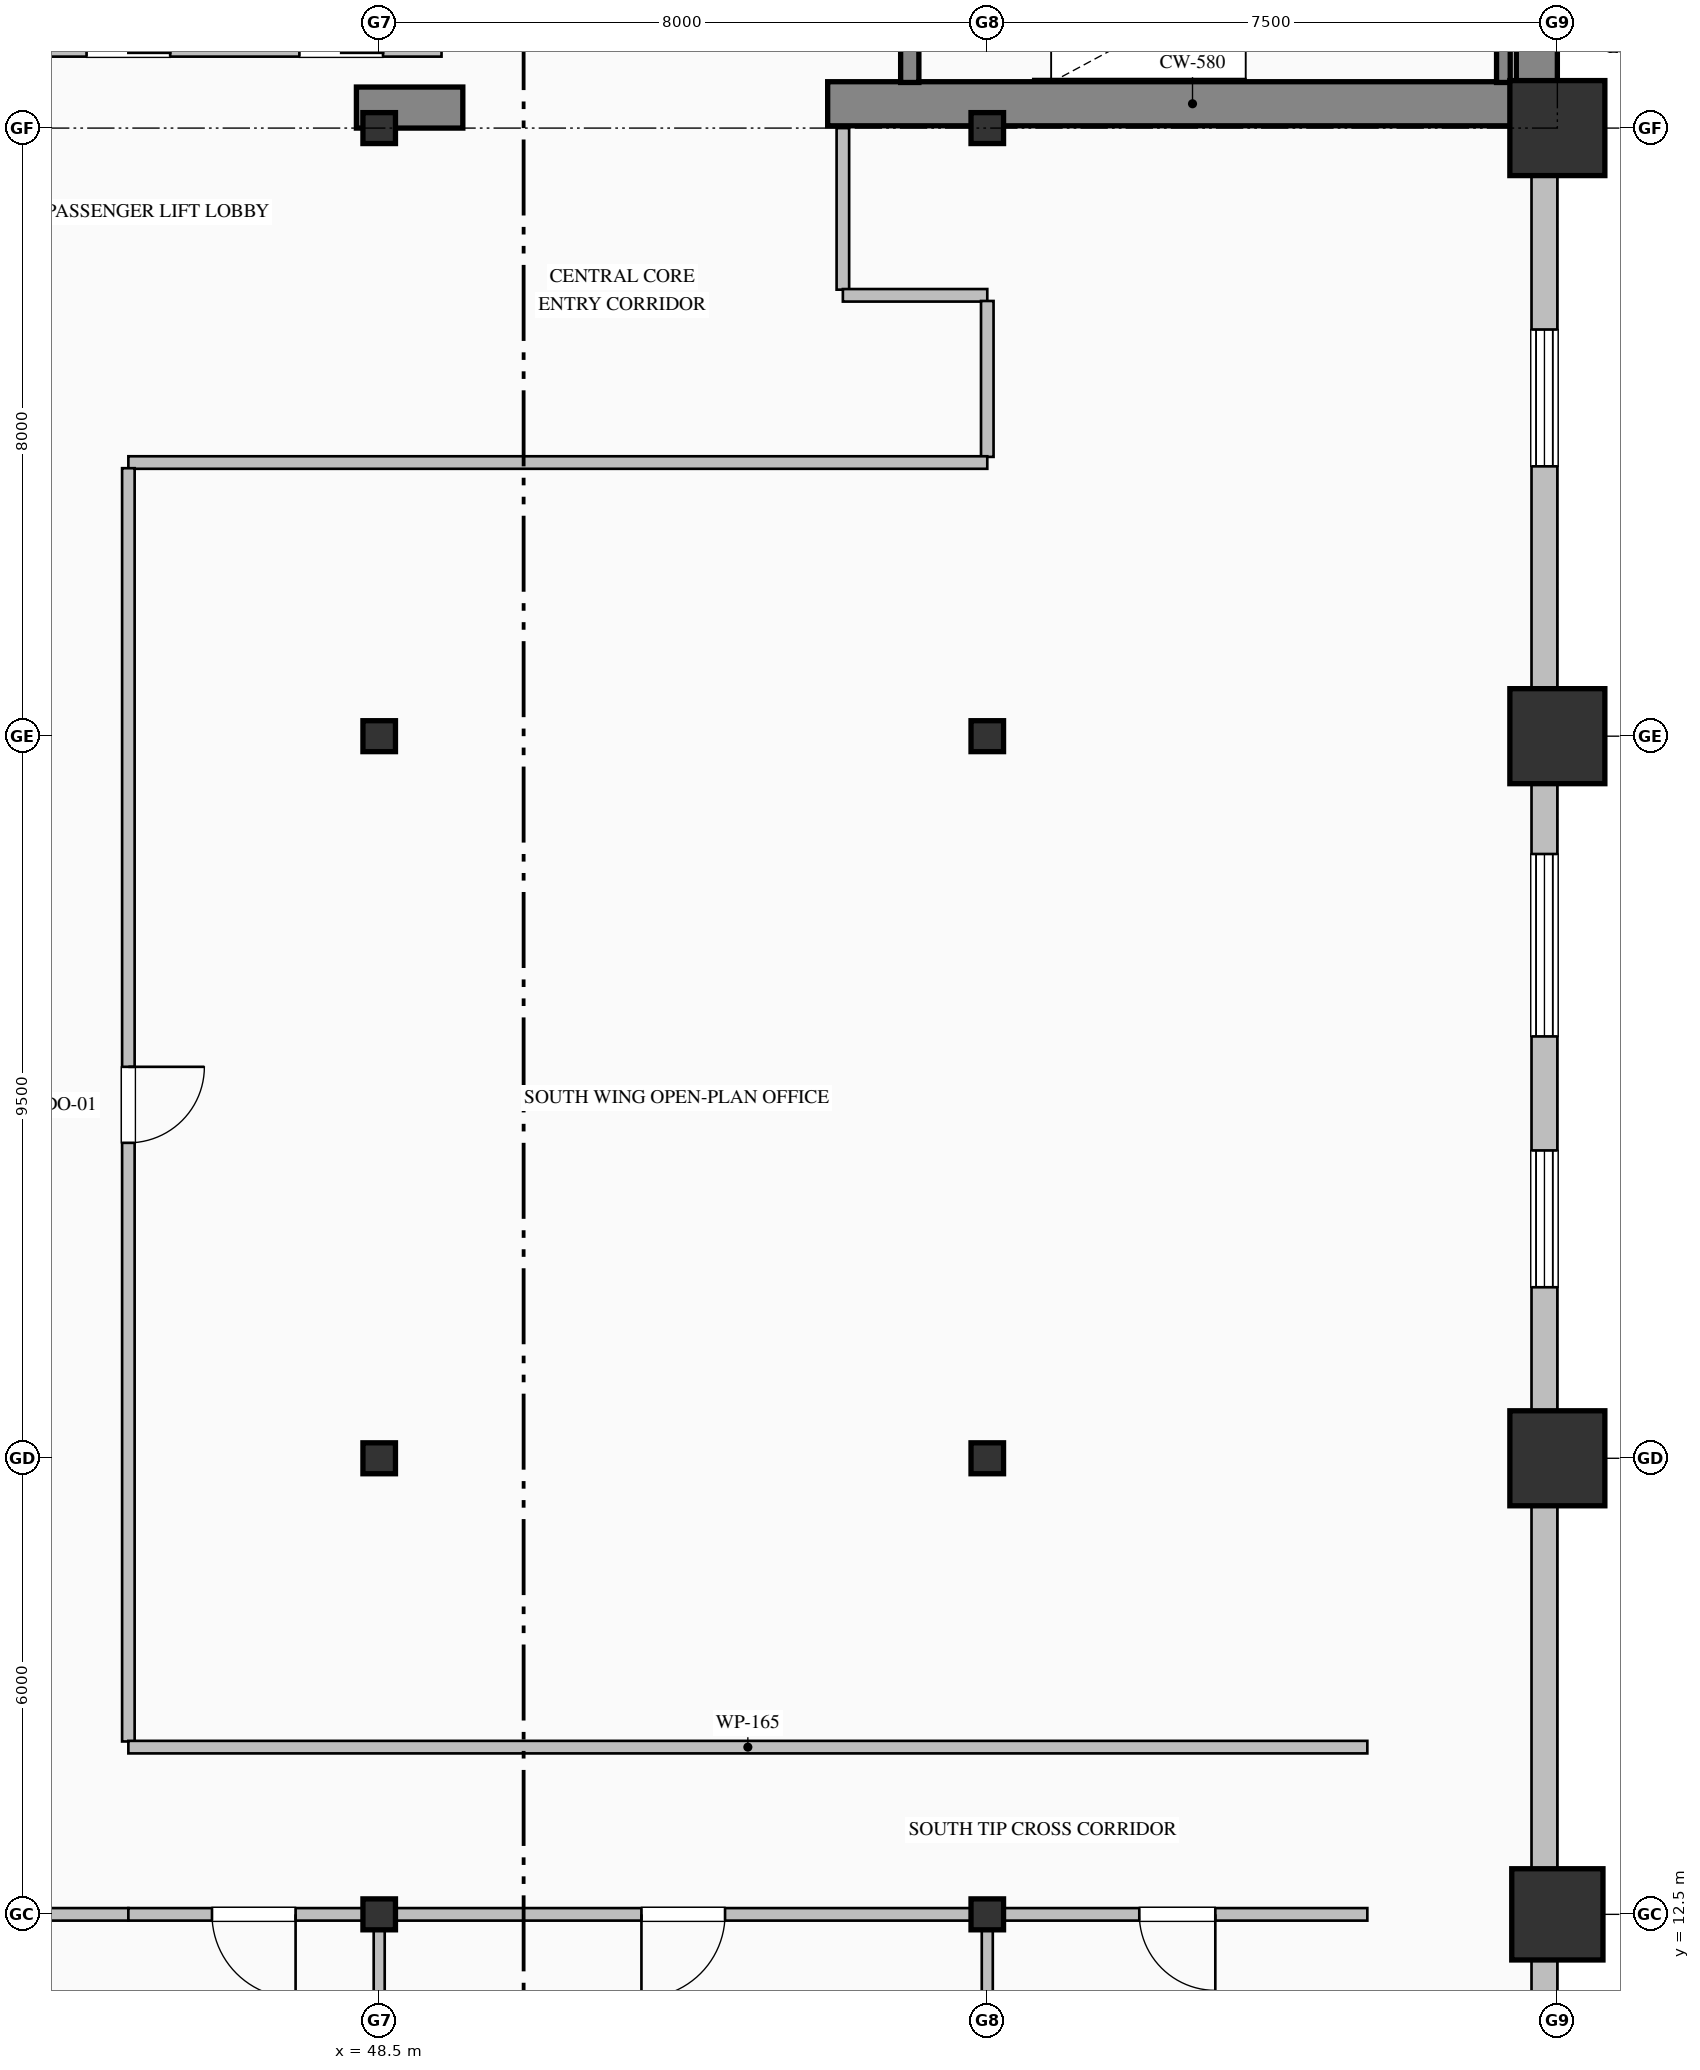
"""IFC4 building model, lengths in metres.
Left out: names, types, materials, properties, quantities, classifications, styles, units other than length and angle.
Written with IfcOpenShell. Run it as: python <this file> out.ifc"""

import sys

from ifc_helpers import new_model, si_unit, direction, frame, frame_2d, origin, origin_2d, place, context, subcontext, project, spatial, rectangle, hollow_rectangle, hollow_circle, i_section, extrude, element, fill, save


model = new_model("IFC4")
c1 = context("Model", 3, precision=1e-05, world=origin(), true_north=direction((0.0, 1.0)))
c2 = subcontext(c1, "Body", "Model", "MODEL_VIEW")
j1 = project(units=[si_unit("LENGTHUNIT", "METRE"), si_unit("PLANEANGLEUNIT", "RADIAN")], contexts=[c1])
p1 = place(None, origin())
s1 = spatial("IfcSite", under=j1, at=p1, CompositionType="ELEMENT")
p2 = place(p1, origin())
s2 = spatial("IfcBuilding", under=s1, at=p2, CompositionType="ELEMENT")
p3 = place(p2, frame((0.0, 0.0, 52.2)))
s3 = spatial("IfcBuildingStorey", under=s2, at=p3, CompositionType="ELEMENT", Elevation=52.2)
p4 = place(p3, frame((63.73, 36.32, 0.0), z_axis=(0.0, 0.0, 1.0), x_axis=(0.0, 1.0, 0.0)))
e1 = element("IfcWall", 1, at=p4, inside=s3, PredefinedType="SHEAR", context=c2, shape_type="SweptSolid", body=[
    extrude(rectangle(XDim=15.14, YDim=0.54, at=frame_2d((7.57, 0.0))), origin(), (0.0, 0.0, 1.0), 3.75),
])
p5 = place(p3, frame((48.2, 36.27, 0.0), z_axis=(0.0, 0.0, 1.0), x_axis=(1.0, 0.0, 0.0)))
e2 = element("IfcWall", 2, at=p5, inside=s3, PredefinedType="SHEAR", context=c2, shape_type="SweptSolid", body=[
    extrude(rectangle(XDim=1.4, YDim=0.54, at=frame_2d((0.7, 0.0))), origin(), (0.0, 0.0, 1.0), 3.75),
])
p6 = place(p3, frame((54.4, 36.32, 0.0), z_axis=(0.0, 0.0, 1.0), x_axis=(1.0, 0.0, 0.0)))
e3 = element("IfcWall", 3, at=p6, inside=s3, PredefinedType="SHEAR", context=c2, shape_type="SweptSolid", body=[
    extrude(rectangle(XDim=9.6, YDim=0.58, at=frame_2d((4.8, 0.0))), origin(), (0.0, 0.0, 1.0), 4.0),
])
for number, where, z_axis, x_axis in (
    (4, (48.5, 12.5, 0.0), (0.0, 0.0, 1.0), (1.0, 0.0, 0.0)),
    (5, (48.5, 18.5, 0.0), (0.0, 0.0, 1.0), (1.0, 0.0, 0.0)),
    (6, (48.5, 28.0, 0.0), (0.0, 0.0, 1.0), (1.0, 0.0, 0.0)),
    (7, (48.5, 36.0, 0.0), (0.0, 0.0, 1.0), (1.0, 0.0, 0.0)),
    (8, (56.5, 12.5, 0.0), (0.0, 0.0, 1.0), (1.0, 0.0, 0.0)),
    (9, (56.5, 18.5, 0.0), (0.0, 0.0, 1.0), (1.0, 0.0, 0.0)),
    (10, (56.5, 28.0, 0.0), (0.0, 0.0, 1.0), (1.0, 0.0, 0.0)),
    (11, (56.5, 36.0, 0.0), (0.0, 0.0, 1.0), (1.0, 0.0, 0.0)),
):
    element("IfcColumn", number, at=place(p3, frame(where, z_axis=z_axis, x_axis=x_axis)), inside=s3, PredefinedType="COLUMN", context=c2, shape_type="SweptSolid", body=[
        extrude(i_section(OverallWidth=0.407, OverallDepth=0.428, WebThickness=0.02, FlangeThickness=0.035, FilletRadius=0.022, at=origin_2d()), origin(), (0.0, 0.0, 1.0), 4.0),
    ])
p7 = place(p3, frame((64.0, 12.5, 0.0), z_axis=(0.0, 0.0, 1.0), x_axis=(1.0, 0.0, 0.0)))
e12 = element("IfcColumn", 12, at=p7, inside=s3, PredefinedType="COLUMN", context=c2, shape_type="SweptSolid", body=[
    extrude(hollow_circle(Radius=0.6, WallThickness=0.04, at=origin_2d()), origin(), (0.0, 0.0, 1.0), 4.0),
])
for number, where, z_axis, x_axis in (
    (13, (64.0, 18.5, 0.0), (0.0, 0.0, 1.0), (1.0, 0.0, 0.0)),
    (14, (64.0, 28.0, 0.0), (0.0, 0.0, 1.0), (1.0, 0.0, 0.0)),
    (15, (64.0, 36.0, 0.0), (0.0, 0.0, 1.0), (1.0, 0.0, 0.0)),
):
    element("IfcColumn", number, at=place(p3, frame(where, z_axis=z_axis, x_axis=x_axis)), inside=s3, PredefinedType="COLUMN", context=c2, shape_type="SweptSolid", body=[
        extrude(hollow_rectangle(XDim=1.25, YDim=1.25, WallThickness=0.045, at=origin_2d()), origin(), (0.0, 0.0, 1.0), 4.0),
    ])
p8 = place(p3, frame((63.83, 36.05, 0.0), z_axis=(0.0, 0.0, 1.0), x_axis=(0.0, -1.0, 0.0)))
e16 = element("IfcWall", 16, at=p8, inside=s3, PredefinedType="SOLIDWALL", context=c2, shape_type="SweptSolid", body=[
    extrude(rectangle(XDim=28.05, YDim=0.34, at=frame_2d((14.025, 0.0))), origin(), (0.0, 0.0, 1.0), 3.25),
])
p9 = place(p8, frame((2.7, 0.0, 0.85)))
e17 = element("IfcOpeningElement", 17, at=p9, cuts=e16, PredefinedType="OPENING", context=c2, shape_type="SweptSolid", body=[
    extrude(rectangle(XDim=1.8, YDim=2.05, at=frame_2d((0.9, 1.025))), frame((0.0, 0.18, 0.0), z_axis=(0.0, -1.0, 0.0), x_axis=(1.0, 0.0, 0.0)), (0.0, 0.0, 1.0), 0.36),
])
p10 = place(p8, frame((9.6, 0.0, 0.8)))
e18 = element("IfcOpeningElement", 18, at=p10, cuts=e16, PredefinedType="OPENING", context=c2, shape_type="SweptSolid", body=[
    extrude(rectangle(XDim=2.4, YDim=2.15, at=frame_2d((1.2, 1.075))), frame((0.0, 0.18, 0.0), z_axis=(0.0, -1.0, 0.0), x_axis=(1.0, 0.0, 0.0)), (0.0, 0.0, 1.0), 0.36),
])
p11 = place(p8, frame((13.5, 0.0, 0.85)))
e19 = element("IfcOpeningElement", 19, at=p11, cuts=e16, PredefinedType="OPENING", context=c2, shape_type="SweptSolid", body=[
    extrude(rectangle(XDim=1.8, YDim=2.05, at=frame_2d((0.9, 1.025))), frame((0.0, 0.18, 0.0), z_axis=(0.0, -1.0, 0.0), x_axis=(1.0, 0.0, 0.0)), (0.0, 0.0, 1.0), 0.36),
])
p12 = place(p3, frame((55.48, 39.75, 0.0), z_axis=(0.0, 0.0, 1.0), x_axis=(0.0, -1.0, 0.0)))
e20 = element("IfcWall", 20, at=p12, inside=s3, PredefinedType="SOLIDWALL", context=c2, shape_type="SweptSolid", body=[
    extrude(rectangle(XDim=3.15, YDim=0.24, at=frame_2d((1.575, 0.0))), origin(), (0.0, 0.0, 1.0), 4.0),
])
p13 = place(p12, frame((1.0, 0.0, 0.0)))
e21 = element("IfcOpeningElement", 21, at=p13, cuts=e20, PredefinedType="OPENING", context=c2, shape_type="SweptSolid", body=[
    extrude(rectangle(XDim=1.15, YDim=2.2, at=frame_2d((0.575, 1.1))), frame((0.0, 0.13, 0.0), z_axis=(0.0, -1.0, 0.0), x_axis=(1.0, 0.0, 0.0)), (0.0, 0.0, 1.0), 0.26),
])
p14 = place(p3, frame((63.29, 36.6, 0.0), z_axis=(0.0, 0.0, 1.0), x_axis=(0.0, 1.0, 0.0)))
e22 = element("IfcWall", 22, at=p14, inside=s3, PredefinedType="SOLIDWALL", context=c2, shape_type="SweptSolid", body=[
    extrude(rectangle(XDim=3.15, YDim=0.18, at=frame_2d((1.575, 0.0))), origin(), (0.0, 0.0, 1.0), 4.0),
])
p15 = place(p3, frame((49.32, 37.05, 0.0), z_axis=(0.0, 0.0, 1.0), x_axis=(-1.0, 0.0, 0.0)))
e23 = element("IfcWall", 23, at=p15, inside=s3, PredefinedType="PARTITIONING", context=c2, shape_type="SweptSolid", body=[
    extrude(rectangle(XDim=8.24, YDim=0.22, at=frame_2d((4.12, 0.0))), origin(), (0.0, 0.0, 1.0), 3.75),
])
p16 = place(p15, frame((6.37, 0.0, 0.0)))
e24 = element("IfcOpeningElement", 24, at=p16, cuts=e23, PredefinedType="OPENING", context=c2, shape_type="SweptSolid", body=[
    extrude(rectangle(XDim=1.1, YDim=2.2, at=frame_2d((0.55, 1.1))), frame((0.0, 0.12, 0.0), z_axis=(0.0, -1.0, 0.0), x_axis=(1.0, 0.0, 0.0)), (0.0, 0.0, 1.0), 0.24),
])
p17 = place(p15, frame((3.57, 0.0, 0.0)))
e25 = element("IfcOpeningElement", 25, at=p17, cuts=e23, PredefinedType="OPENING", context=c2, shape_type="SweptSolid", body=[
    extrude(rectangle(XDim=1.1, YDim=2.2, at=frame_2d((0.55, 1.1))), frame((0.0, 0.12, 0.0), z_axis=(0.0, -1.0, 0.0), x_axis=(1.0, 0.0, 0.0)), (0.0, 0.0, 1.0), 0.24),
])
p18 = place(p15, frame((0.77, 0.0, 0.0)))
e26 = element("IfcOpeningElement", 26, at=p18, cuts=e23, PredefinedType="OPENING", context=c2, shape_type="SweptSolid", body=[
    extrude(rectangle(XDim=1.1, YDim=2.2, at=frame_2d((0.55, 1.1))), frame((0.0, 0.12, 0.0), z_axis=(0.0, -1.0, 0.0), x_axis=(1.0, 0.0, 0.0)), (0.0, 0.0, 1.0), 0.24),
])
p19 = place(p3, frame((54.6, 36.0, 0.0), z_axis=(0.0, 0.0, 1.0), x_axis=(0.0, -1.0, 0.0)))
e27 = element("IfcWall", 27, at=p19, inside=s3, PredefinedType="PARTITIONING", context=c2, shape_type="SweptSolid", body=[
    extrude(rectangle(XDim=2.125, YDim=0.165, at=frame_2d((1.063, 0.0))), origin(), (0.0, 0.0, 1.0), 3.75),
])
p20 = place(p3, frame((54.6, 33.8, 0.0), z_axis=(0.0, 0.0, 1.0), x_axis=(1.0, 0.0, 0.0)))
e28 = element("IfcWall", 28, at=p20, inside=s3, PredefinedType="PARTITIONING", context=c2, shape_type="SweptSolid", body=[
    extrude(rectangle(XDim=1.9, YDim=0.165, at=frame_2d((0.95, 0.0))), origin(), (0.0, 0.0, 1.0), 3.75),
])
p21 = place(p3, frame((56.5, 33.726, 0.0), z_axis=(0.0, 0.0, 1.0), x_axis=(0.0, -1.0, 0.0)))
e29 = element("IfcWall", 29, at=p21, inside=s3, PredefinedType="PARTITIONING", context=c2, shape_type="SweptSolid", body=[
    extrude(rectangle(XDim=2.051, YDim=0.165, at=frame_2d((1.025, 0.0))), origin(), (0.0, 0.0, 1.0), 3.042),
])
p22 = place(p3, frame((56.5, 31.6, 0.0), z_axis=(0.0, 0.0, 1.0), x_axis=(-1.0, 0.0, 0.0)))
e30 = element("IfcWall", 30, at=p22, inside=s3, PredefinedType="PARTITIONING", context=c2, shape_type="SweptSolid", body=[
    extrude(rectangle(XDim=11.3, YDim=0.165, at=frame_2d((5.65, 0.0))), origin(), (0.0, 0.0, 1.0), 3.75),
])
p23 = place(p3, frame((45.2, 31.525, 0.0), z_axis=(0.0, 0.0, 1.0), x_axis=(0.0, -1.0, 0.0)))
e31 = element("IfcWall", 31, at=p23, inside=s3, PredefinedType="PARTITIONING", context=c2, shape_type="SweptSolid", body=[
    extrude(rectangle(XDim=16.751, YDim=0.165, at=frame_2d((8.375, 0.0))), origin(), (0.0, 0.0, 1.0), 3.75),
])
p24 = place(p23, frame((7.875, 0.0, 0.0)))
e32 = element("IfcOpeningElement", 32, at=p24, cuts=e31, PredefinedType="OPENING", context=c2, shape_type="SweptSolid", body=[
    extrude(rectangle(XDim=1.0, YDim=2.15, at=frame_2d((0.5, 1.075))), frame((0.0, 0.093, 0.0), z_axis=(0.0, -1.0, 0.0), x_axis=(1.0, 0.0, 0.0)), (0.0, 0.0, 1.0), 0.185),
])
p25 = place(p3, frame((45.2, 12.5, 0.0), z_axis=(0.0, 0.0, 1.0), x_axis=(-1.0, 0.0, 0.0)))
e33 = element("IfcWall", 33, at=p25, inside=s3, PredefinedType="PARTITIONING", context=c2, shape_type="SweptSolid", body=[
    extrude(rectangle(XDim=2.2, YDim=0.165, at=frame_2d((1.1, 0.0))), origin(), (0.0, 0.0, 1.0), 3.042),
])
p26 = place(p3, frame((45.2, 14.7, 0.0), z_axis=(0.0, 0.0, 1.0), x_axis=(1.0, 0.0, 0.0)))
e34 = element("IfcWall", 34, at=p26, inside=s3, PredefinedType="PARTITIONING", context=c2, shape_type="SweptSolid", body=[
    extrude(rectangle(XDim=16.3, YDim=0.165, at=frame_2d((8.15, 0.0))), origin(), (0.0, 0.0, 1.0), 3.75),
])
p27 = place(p3, frame((48.5, 12.5, 0.0), z_axis=(0.0, 0.0, 1.0), x_axis=(-1.0, 0.0, 0.0)))
e35 = element("IfcWall", 35, at=p27, inside=s3, PredefinedType="PARTITIONING", context=c2, shape_type="SweptSolid", body=[
    extrude(rectangle(XDim=3.3, YDim=0.165, at=frame_2d((1.65, 0.0))), origin(), (0.0, 0.0, 1.0), 3.042),
])
p28 = place(p27, frame((1.1, 0.0, 0.0)))
e36 = element("IfcOpeningElement", 36, at=p28, cuts=e35, PredefinedType="OPENING", context=c2, shape_type="SweptSolid", body=[
    extrude(rectangle(XDim=1.1, YDim=2.2, at=frame_2d((0.55, 1.1))), frame((0.0, 0.093, 0.0), z_axis=(0.0, -1.0, 0.0), x_axis=(1.0, 0.0, 0.0)), (0.0, 0.0, 1.0), 0.185),
])
p29 = place(p3, frame((56.5, 12.5, 0.0), z_axis=(0.0, 0.0, 1.0), x_axis=(-1.0, 0.0, 0.0)))
e37 = element("IfcWall", 37, at=p29, inside=s3, PredefinedType="PARTITIONING", context=c2, shape_type="SweptSolid", body=[
    extrude(rectangle(XDim=8.0, YDim=0.165, at=frame_2d((4.0, 0.0))), origin(), (0.0, 0.0, 1.0), 3.042),
])
p30 = place(p29, frame((3.45, 0.0, 0.0)))
e38 = element("IfcOpeningElement", 38, at=p30, cuts=e37, PredefinedType="OPENING", context=c2, shape_type="SweptSolid", body=[
    extrude(rectangle(XDim=1.1, YDim=2.2, at=frame_2d((0.55, 1.1))), frame((0.0, 0.093, 0.0), z_axis=(0.0, -1.0, 0.0), x_axis=(1.0, 0.0, 0.0)), (0.0, 0.0, 1.0), 0.185),
])
p31 = place(p3, frame((61.5, 12.5, 0.0), z_axis=(0.0, 0.0, 1.0), x_axis=(-1.0, 0.0, 0.0)))
e39 = element("IfcWall", 39, at=p31, inside=s3, PredefinedType="PARTITIONING", context=c2, shape_type="SweptSolid", body=[
    extrude(rectangle(XDim=5.0, YDim=0.165, at=frame_2d((2.5, 0.0))), origin(), (0.0, 0.0, 1.0), 3.042),
])
p32 = place(p31, frame((2.0, 0.0, 0.0)))
e40 = element("IfcOpeningElement", 40, at=p32, cuts=e39, PredefinedType="OPENING", context=c2, shape_type="SweptSolid", body=[
    extrude(rectangle(XDim=1.0, YDim=2.15, at=frame_2d((0.5, 1.075))), frame((0.0, 0.093, 0.0), z_axis=(0.0, -1.0, 0.0), x_axis=(1.0, 0.0, 0.0)), (0.0, 0.0, 1.0), 0.185),
])
for number, where, z_axis, x_axis in (
    (41, (48.5, 12.426, 0.0), (0.0, 0.0, 1.0), (0.0, -1.0, 0.0)),
    (42, (56.5, 12.426, 0.0), (0.0, 0.0, 1.0), (0.0, -1.0, 0.0)),
):
    element("IfcWall", number, at=place(p3, frame(where, z_axis=z_axis, x_axis=x_axis)), inside=s3, PredefinedType="PARTITIONING", context=c2, shape_type="SweptSolid", body=[
        extrude(rectangle(XDim=8.094, YDim=0.145, at=frame_2d((4.047, 0.0))), origin(), (0.0, 0.0, 1.0), 3.042),
    ])
p33 = place(p9, origin())
e43 = element("IfcWindow", 43, at=p33, inside=s3, PartitioningType="TRIPLE_PANEL_VERTICAL", PredefinedType="WINDOW", context=c2, shape_type="SweptSolid", body=[
    extrude(rectangle(XDim=1.8, YDim=2.05, at=frame_2d((0.9, 1.025))), frame((0.0, 0.15, 0.0), z_axis=(0.0, -1.0, 0.0), x_axis=(1.0, 0.0, 0.0)), (0.0, 0.0, 1.0), 0.06),
])
fill(e17, e43)
p34 = place(p10, origin())
e44 = element("IfcWindow", 44, at=p34, inside=s3, PartitioningType="TRIPLE_PANEL_VERTICAL", PredefinedType="WINDOW", context=c2, shape_type="SweptSolid", body=[
    extrude(rectangle(XDim=2.4, YDim=2.15, at=frame_2d((1.2, 1.075))), frame((0.0, 0.15, 0.0), z_axis=(0.0, -1.0, 0.0), x_axis=(1.0, 0.0, 0.0)), (0.0, 0.0, 1.0), 0.06),
])
fill(e18, e44)
p35 = place(p11, origin())
e45 = element("IfcWindow", 45, at=p35, inside=s3, PartitioningType="TRIPLE_PANEL_VERTICAL", PredefinedType="WINDOW", context=c2, shape_type="SweptSolid", body=[
    extrude(rectangle(XDim=1.8, YDim=2.05, at=frame_2d((0.9, 1.025))), frame((0.0, 0.15, 0.0), z_axis=(0.0, -1.0, 0.0), x_axis=(1.0, 0.0, 0.0)), (0.0, 0.0, 1.0), 0.06),
])
fill(e19, e45)
p36 = place(p24, origin())
e46 = element("IfcDoor", 46, at=p36, inside=s3, OperationType="SINGLE_SWING_LEFT", PredefinedType="DOOR", context=c2, shape_type="SweptSolid", body=[
    extrude(rectangle(XDim=1.0, YDim=2.15, at=frame_2d((0.5, 1.075))), frame((0.0, 0.025, 0.0), z_axis=(0.0, -1.0, 0.0), x_axis=(1.0, 0.0, 0.0)), (0.0, 0.0, 1.0), 0.05),
])
fill(e32, e46)
p37 = place(p28, origin())
e47 = element("IfcDoor", 47, at=p37, inside=s3, OperationType="SINGLE_SWING_LEFT", PredefinedType="DOOR", context=c2, shape_type="SweptSolid", body=[
    extrude(rectangle(XDim=1.1, YDim=2.2, at=frame_2d((0.55, 1.1))), frame((0.0, 0.025, 0.0), z_axis=(0.0, -1.0, 0.0), x_axis=(1.0, 0.0, 0.0)), (0.0, 0.0, 1.0), 0.05),
])
fill(e36, e47)
p38 = place(p30, origin())
e48 = element("IfcDoor", 48, at=p38, inside=s3, OperationType="SINGLE_SWING_RIGHT", PredefinedType="DOOR", context=c2, shape_type="SweptSolid", body=[
    extrude(rectangle(XDim=1.1, YDim=2.2, at=frame_2d((0.55, 1.1))), frame((0.0, 0.025, 0.0), z_axis=(0.0, -1.0, 0.0), x_axis=(1.0, 0.0, 0.0)), (0.0, 0.0, 1.0), 0.05),
])
fill(e38, e48)
p39 = place(p32, origin())
e49 = element("IfcDoor", 49, at=p39, inside=s3, OperationType="SINGLE_SWING_LEFT", PredefinedType="DOOR", context=c2, shape_type="SweptSolid", body=[
    extrude(rectangle(XDim=1.0, YDim=2.15, at=frame_2d((0.5, 1.075))), frame((0.0, 0.025, 0.0), z_axis=(0.0, -1.0, 0.0), x_axis=(1.0, 0.0, 0.0)), (0.0, 0.0, 1.0), 0.05),
])
fill(e40, e49)
save(model, sys.argv[1])
